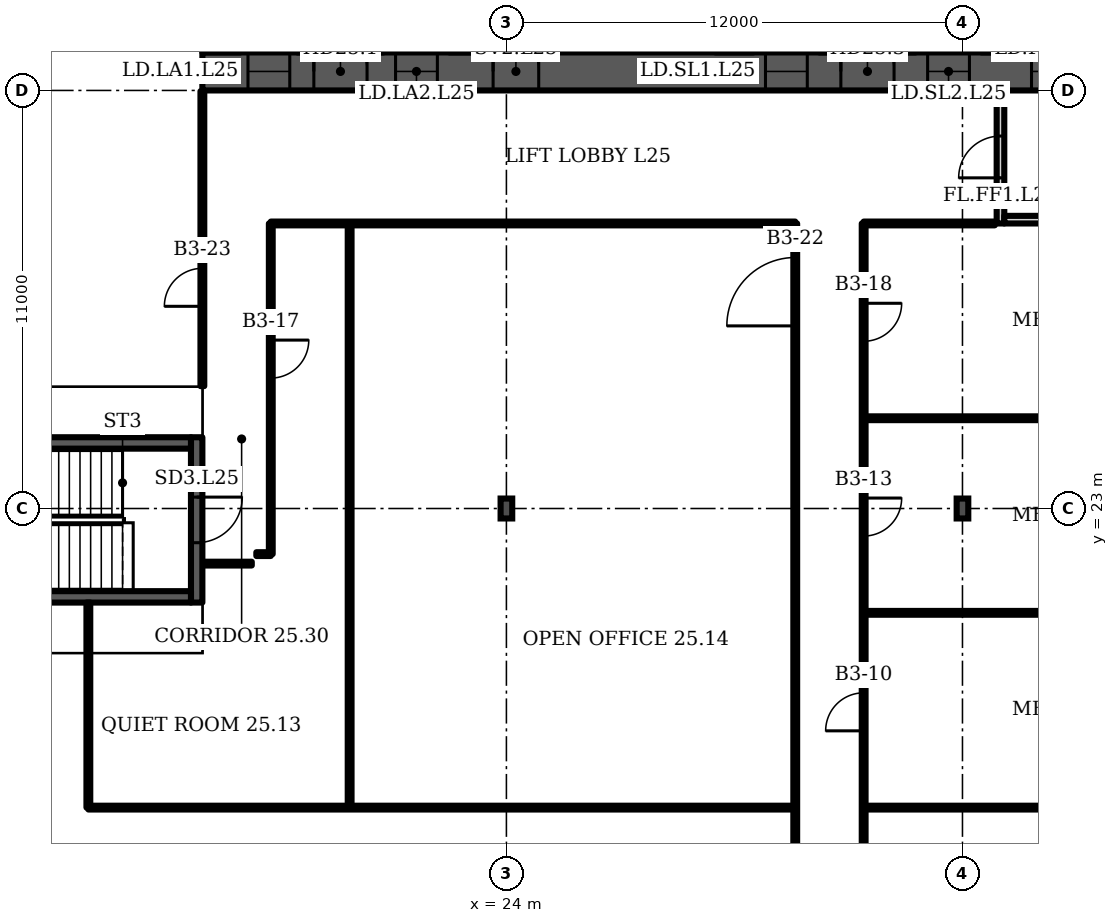
"""IFC4 building model, lengths in metres.
Left out: names, types, materials, properties, quantities, classifications, styles, units other than length and angle.
Written with IfcOpenShell. Run it as: python <this file> out.ifc"""

import sys

from ifc_helpers import new_model, si_unit, direction, frame, frame_2d, origin, origin_2d, place, context, subcontext, project, spatial, rectangle, i_section, extrude, element, fill, save


model = new_model("IFC4")
c1 = context("Model", 3, precision=1e-05, world=origin(), true_north=direction((0.0, 1.0)))
c2 = subcontext(c1, "Body", "Model", "MODEL_VIEW")
j1 = project(units=[si_unit("LENGTHUNIT", "METRE"), si_unit("PLANEANGLEUNIT", "RADIAN")], contexts=[c1])
p1 = place(None, origin())
s1 = spatial("IfcSite", under=j1, at=p1, CompositionType="ELEMENT")
p2 = place(p1, origin())
s2 = spatial("IfcBuilding", under=s1, at=p2, CompositionType="ELEMENT")
p3 = place(p2, frame((0.0, 0.0, 111.1)))
s3 = spatial("IfcBuildingStorey", under=s2, at=p3, CompositionType="ELEMENT", Elevation=111.1)
p4 = place(p3, frame((16.0, 34.5, 0.0), z_axis=(0.0, 0.0, 1.0), x_axis=(1.0, 0.0, 0.0)))
e1 = element("IfcWall", 1, at=p4, inside=s3, PredefinedType="SHEAR", context=c2, shape_type="SweptSolid", body=[
    extrude(rectangle(XDim=49.0, YDim=1.0, at=frame_2d((24.5, 0.0))), origin(), (0.0, 0.0, 1.0), 3.6),
])
p5 = place(p4, frame((1.2, 0.0, 0.0)))
e2 = element("IfcOpeningElement", 2, at=p5, cuts=e1, PredefinedType="OPENING", context=c2, shape_type="SweptSolid", body=[
    extrude(rectangle(XDim=1.1, YDim=2.1, at=frame_2d((0.55, 1.05))), frame((0.0, 0.51, 0.0), z_axis=(0.0, -1.0, 0.0), x_axis=(1.0, 0.0, 0.0)), (0.0, 0.0, 1.0), 1.02),
])
p6 = place(p4, frame((5.083, 0.0, 0.0)))
e3 = element("IfcOpeningElement", 3, at=p6, cuts=e1, PredefinedType="OPENING", context=c2, shape_type="SweptSolid", body=[
    extrude(rectangle(XDim=1.1, YDim=2.1, at=frame_2d((0.55, 1.05))), frame((0.0, 0.51, 0.0), z_axis=(0.0, -1.0, 0.0), x_axis=(1.0, 0.0, 0.0)), (0.0, 0.0, 1.0), 1.02),
])
p7 = place(p4, frame((2.933, 0.0, 0.0)))
e4 = element("IfcOpeningElement", 4, at=p7, cuts=e1, PredefinedType="OPENING", context=c2, shape_type="SweptSolid", body=[
    extrude(rectangle(XDim=1.4, YDim=2.1, at=frame_2d((0.7, 1.05))), frame((0.0, 0.51, 0.0), z_axis=(0.0, -1.0, 0.0), x_axis=(1.0, 0.0, 0.0)), (0.0, 0.0, 1.0), 1.02),
])
p8 = place(p4, frame((7.65, 0.0, 0.0)))
e5 = element("IfcOpeningElement", 5, at=p8, cuts=e1, PredefinedType="OPENING", context=c2, shape_type="SweptSolid", body=[
    extrude(rectangle(XDim=1.2, YDim=2.1, at=frame_2d((0.6, 1.05))), frame((0.0, 0.51, 0.0), z_axis=(0.0, -1.0, 0.0), x_axis=(1.0, 0.0, 0.0)), (0.0, 0.0, 1.0), 1.02),
])
p9 = place(p4, frame((14.817, 0.0, 0.0)))
e6 = element("IfcOpeningElement", 6, at=p9, cuts=e1, PredefinedType="OPENING", context=c2, shape_type="SweptSolid", body=[
    extrude(rectangle(XDim=1.1, YDim=2.1, at=frame_2d((0.55, 1.05))), frame((0.0, 0.51, 0.0), z_axis=(0.0, -1.0, 0.0), x_axis=(1.0, 0.0, 0.0)), (0.0, 0.0, 1.0), 1.02),
])
p10 = place(p4, frame((19.083, 0.0, 0.0)))
e7 = element("IfcOpeningElement", 7, at=p10, cuts=e1, PredefinedType="OPENING", context=c2, shape_type="SweptSolid", body=[
    extrude(rectangle(XDim=1.1, YDim=2.1, at=frame_2d((0.55, 1.05))), frame((0.0, 0.51, 0.0), z_axis=(0.0, -1.0, 0.0), x_axis=(1.0, 0.0, 0.0)), (0.0, 0.0, 1.0), 1.02),
])
p11 = place(p4, frame((16.8, 0.0, 0.0)))
e8 = element("IfcOpeningElement", 8, at=p11, cuts=e1, PredefinedType="OPENING", context=c2, shape_type="SweptSolid", body=[
    extrude(rectangle(XDim=1.4, YDim=2.1, at=frame_2d((0.7, 1.05))), frame((0.0, 0.51, 0.0), z_axis=(0.0, -1.0, 0.0), x_axis=(1.0, 0.0, 0.0)), (0.0, 0.0, 1.0), 1.02),
])
p12 = place(p4, frame((21.817, 0.0, 0.0)))
e9 = element("IfcOpeningElement", 9, at=p12, cuts=e1, PredefinedType="OPENING", context=c2, shape_type="SweptSolid", body=[
    extrude(rectangle(XDim=1.1, YDim=2.1, at=frame_2d((0.55, 1.05))), frame((0.0, 0.51, 0.0), z_axis=(0.0, -1.0, 0.0), x_axis=(1.0, 0.0, 0.0)), (0.0, 0.0, 1.0), 1.02),
])
p13 = place(p4, frame((26.083, 0.0, 0.0)))
e10 = element("IfcOpeningElement", 10, at=p13, cuts=e1, PredefinedType="OPENING", context=c2, shape_type="SweptSolid", body=[
    extrude(rectangle(XDim=1.1, YDim=2.1, at=frame_2d((0.55, 1.05))), frame((0.0, 0.51, 0.0), z_axis=(0.0, -1.0, 0.0), x_axis=(1.0, 0.0, 0.0)), (0.0, 0.0, 1.0), 1.02),
])
p14 = place(p4, frame((33.15, 0.0, 0.0)))
e11 = element("IfcOpeningElement", 11, at=p14, cuts=e1, PredefinedType="OPENING", context=c2, shape_type="SweptSolid", body=[
    extrude(rectangle(XDim=1.2, YDim=2.1, at=frame_2d((0.6, 1.05))), frame((0.0, 0.51, 0.0), z_axis=(0.0, -1.0, 0.0), x_axis=(1.0, 0.0, 0.0)), (0.0, 0.0, 1.0), 1.02),
])
p15 = place(p4, frame((37.8, 0.0, 0.0)))
e12 = element("IfcOpeningElement", 12, at=p15, cuts=e1, PredefinedType="OPENING", context=c2, shape_type="SweptSolid", body=[
    extrude(rectangle(XDim=1.4, YDim=2.1, at=frame_2d((0.7, 1.05))), frame((0.0, 0.51, 0.0), z_axis=(0.0, -1.0, 0.0), x_axis=(1.0, 0.0, 0.0)), (0.0, 0.0, 1.0), 1.02),
])
p16 = place(p4, frame((42.817, 0.0, 0.0)))
e13 = element("IfcOpeningElement", 13, at=p16, cuts=e1, PredefinedType="OPENING", context=c2, shape_type="SweptSolid", body=[
    extrude(rectangle(XDim=1.1, YDim=2.1, at=frame_2d((0.55, 1.05))), frame((0.0, 0.51, 0.0), z_axis=(0.0, -1.0, 0.0), x_axis=(1.0, 0.0, 0.0)), (0.0, 0.0, 1.0), 1.02),
])
p17 = place(p4, frame((46.7, 0.0, 0.0)))
e14 = element("IfcOpeningElement", 14, at=p17, cuts=e1, PredefinedType="OPENING", context=c2, shape_type="SweptSolid", body=[
    extrude(rectangle(XDim=1.1, YDim=2.1, at=frame_2d((0.55, 1.05))), frame((0.0, 0.51, 0.0), z_axis=(0.0, -1.0, 0.0), x_axis=(1.0, 0.0, 0.0)), (0.0, 0.0, 1.0), 1.02),
])
p18 = place(p4, frame((44.667, 0.0, 0.0)))
e15 = element("IfcOpeningElement", 15, at=p18, cuts=e1, PredefinedType="OPENING", context=c2, shape_type="SweptSolid", body=[
    extrude(rectangle(XDim=1.4, YDim=2.1, at=frame_2d((0.7, 1.05))), frame((0.0, 0.51, 0.0), z_axis=(0.0, -1.0, 0.0), x_axis=(1.0, 0.0, 0.0)), (0.0, 0.0, 1.0), 1.02),
])
for number, where, z_axis, x_axis in (
    (16, (24.0, 23.0, 0.0), (0.0, 0.0, 1.0), (1.0, 0.0, 0.0)),
    (17, (36.0, 23.0, 0.0), (0.0, 0.0, 1.0), (1.0, 0.0, 0.0)),
):
    element("IfcColumn", number, at=place(p3, frame(where, z_axis=z_axis, x_axis=x_axis)), inside=s3, PredefinedType="COLUMN", context=c2, shape_type="SweptSolid", body=[
        extrude(i_section(OverallWidth=0.306, OverallDepth=0.524, WebThickness=0.021, FlangeThickness=0.04, FilletRadius=0.027, at=origin_2d()), origin(), (0.0, 0.0, 1.0), 3.6),
    ])
p19 = place(p3, frame((37.0, 30.5, 0.0), z_axis=(0.0, 0.0, 1.0), x_axis=(0.0, 1.0, 0.0)))
e18 = element("IfcWall", 18, at=p19, inside=s3, PredefinedType="PARTITIONING", context=c2, shape_type="SweptSolid", body=[
    extrude(rectangle(XDim=3.5, YDim=0.2, at=frame_2d((1.75, 0.0))), origin(), (0.0, 0.0, 1.0), 3.2),
])
p20 = place(p19, frame((1.2, 0.0, 0.0)))
e19 = element("IfcOpeningElement", 19, at=p20, cuts=e18, PredefinedType="OPENING", context=c2, shape_type="SweptSolid", body=[
    extrude(rectangle(XDim=1.1, YDim=2.1, at=frame_2d((0.55, 1.05))), frame((0.0, 0.11, 0.0), z_axis=(0.0, -1.0, 0.0), x_axis=(1.0, 0.0, 0.0)), (0.0, 0.0, 1.0), 0.22),
])
p21 = place(p3, frame((37.1, 30.6, 0.0), z_axis=(0.0, 0.0, 1.0), x_axis=(1.0, 0.0, 0.0)))
e20 = element("IfcWall", 20, at=p21, inside=s3, PredefinedType="PARTITIONING", context=c2, shape_type="SweptSolid", body=[
    extrude(rectangle(XDim=2.8, YDim=0.2, at=frame_2d((1.4, 0.0))), origin(), (0.0, 0.0, 1.0), 3.2),
])
p22 = place(p3, frame((15.85, 20.525, 0.0), z_axis=(0.0, 0.0, 1.0), x_axis=(0.0, 1.0, 0.0)))
e21 = element("IfcWall", 21, at=p22, inside=s3, PredefinedType="SHEAR", context=c2, shape_type="SweptSolid", body=[
    extrude(rectangle(XDim=4.35, YDim=0.3, at=frame_2d((2.175, 0.0))), origin(), (0.0, 0.0, 1.0), 3.2),
])
p23 = place(p22, frame((1.575, 0.0, 0.0)))
e22 = element("IfcOpeningElement", 22, at=p23, cuts=e21, PredefinedType="OPENING", context=c2, shape_type="SweptSolid", body=[
    extrude(rectangle(XDim=1.2, YDim=2.1, at=frame_2d((0.6, 1.05))), frame((0.0, 0.16, 0.0), z_axis=(0.0, -1.0, 0.0), x_axis=(1.0, 0.0, 0.0)), (0.0, 0.0, 1.0), 0.32),
])
p24 = place(p3, frame((13.0, 15.13, 0.0), z_axis=(0.0, 0.0, 1.0), x_axis=(0.0, 1.0, 0.0)))
e23 = element("IfcWall", 23, at=p24, inside=s3, PredefinedType="PARTITIONING", context=c2, shape_type="SweptSolid", body=[
    extrude(rectangle(XDim=5.395, YDim=0.1, at=frame_2d((2.698, 0.0))), origin(), (0.0, 0.0, 1.0), 3.2),
])
p25 = place(p3, frame((13.0, 15.13, 0.0), z_axis=(0.0, 0.0, 1.0), x_axis=(1.0, 0.0, 0.0)))
e24 = element("IfcWall", 24, at=p25, inside=s3, PredefinedType="PARTITIONING", context=c2, shape_type="SweptSolid", body=[
    extrude(rectangle(XDim=18.6, YDim=0.1, at=frame_2d((9.3, 0.0))), origin(), (0.0, 0.0, 1.0), 3.2),
])
p26 = place(p3, frame((16.0, 26.22, 0.0), z_axis=(0.0, 0.0, 1.0), x_axis=(0.0, 1.0, 0.0)))
e25 = element("IfcWall", 25, at=p26, inside=s3, PredefinedType="PARTITIONING", context=c2, shape_type="SweptSolid", body=[
    extrude(rectangle(XDim=7.76, YDim=0.1, at=frame_2d((3.88, 0.0))), origin(), (0.0, 0.0, 1.0), 3.2),
])
p27 = place(p26, frame((2.1, 0.0, 0.0)))
e26 = element("IfcOpeningElement", 26, at=p27, cuts=e25, PredefinedType="OPENING", context=c2, shape_type="SweptSolid", body=[
    extrude(rectangle(XDim=1.0, YDim=2.1, at=frame_2d((0.5, 1.05))), frame((0.0, 0.06, 0.0), z_axis=(0.0, -1.0, 0.0), x_axis=(1.0, 0.0, 0.0)), (0.0, 0.0, 1.0), 0.12),
])
p28 = place(p3, frame((16.02, 21.55, 0.0), z_axis=(0.0, 0.0, 1.0), x_axis=(1.0, 0.0, 0.0)))
e27 = element("IfcWall", 27, at=p28, inside=s3, PredefinedType="PARTITIONING", context=c2, shape_type="SweptSolid", body=[
    extrude(rectangle(XDim=1.28, YDim=0.1, at=frame_2d((0.64, 0.0))), origin(), (0.0, 0.0, 1.0), 3.2),
])
p29 = place(p3, frame((17.42, 21.8, 0.0), z_axis=(0.0, 0.0, 1.0), x_axis=(1.0, 0.0, 0.0)))
e28 = element("IfcWall", 28, at=p29, inside=s3, PredefinedType="PARTITIONING", context=c2, shape_type="SweptSolid", body=[
    extrude(rectangle(XDim=0.38, YDim=0.1, at=frame_2d((0.19, 0.0))), origin(), (0.0, 0.0, 1.0), 3.2),
])
p30 = place(p3, frame((17.8, 21.8, 0.0), z_axis=(0.0, 0.0, 1.0), x_axis=(0.0, 1.0, 0.0)))
e29 = element("IfcWall", 29, at=p30, inside=s3, PredefinedType="PARTITIONING", context=c2, shape_type="SweptSolid", body=[
    extrude(rectangle(XDim=8.7, YDim=0.1, at=frame_2d((4.35, 0.0))), origin(), (0.0, 0.0, 1.0), 3.2),
])
p31 = place(p30, frame((4.631, 0.0, 0.0)))
e30 = element("IfcOpeningElement", 30, at=p31, cuts=e29, PredefinedType="OPENING", context=c2, shape_type="SweptSolid", body=[
    extrude(rectangle(XDim=1.0, YDim=2.1, at=frame_2d((0.5, 1.05))), frame((0.0, 0.06, 0.0), z_axis=(0.0, -1.0, 0.0), x_axis=(1.0, 0.0, 0.0)), (0.0, 0.0, 1.0), 0.12),
])
p32 = place(p3, frame((17.8, 30.5, 0.0), z_axis=(0.0, 0.0, 1.0), x_axis=(1.0, 0.0, 0.0)))
e31 = element("IfcWall", 31, at=p32, inside=s3, PredefinedType="PARTITIONING", context=c2, shape_type="SweptSolid", body=[
    extrude(rectangle(XDim=13.8, YDim=0.1, at=frame_2d((6.9, 0.0))), origin(), (0.0, 0.0, 1.0), 3.2),
])
p33 = place(p3, frame((19.875, 15.13, 0.0), z_axis=(0.0, 0.0, 1.0), x_axis=(0.0, 1.0, 0.0)))
e32 = element("IfcWall", 32, at=p33, inside=s3, PredefinedType="PARTITIONING", context=c2, shape_type="SweptSolid", body=[
    extrude(rectangle(XDim=15.37, YDim=0.1, at=frame_2d((7.685, 0.0))), origin(), (0.0, 0.0, 1.0), 3.2),
])
p34 = place(p3, frame((31.6, 0.56, 0.0), z_axis=(0.0, 0.0, 1.0), x_axis=(0.0, 1.0, 0.0)))
e33 = element("IfcWall", 33, at=p34, inside=s3, PredefinedType="PARTITIONING", context=c2, shape_type="SweptSolid", body=[
    extrude(rectangle(XDim=29.94, YDim=0.1, at=frame_2d((14.97, 0.0))), origin(), (0.0, 0.0, 1.0), 3.2),
])
p35 = place(p34, frame((6.75, 0.0, 0.0)))
e34 = element("IfcOpeningElement", 34, at=p35, cuts=e33, PredefinedType="OPENING", context=c2, shape_type="SweptSolid", body=[
    extrude(rectangle(XDim=1.0, YDim=2.1, at=frame_2d((0.5, 1.05))), frame((0.0, 0.06, 0.0), z_axis=(0.0, -1.0, 0.0), x_axis=(1.0, 0.0, 0.0)), (0.0, 0.0, 1.0), 0.12),
])
p36 = place(p34, frame((27.245, 0.0, 0.0)))
e35 = element("IfcOpeningElement", 35, at=p36, cuts=e33, PredefinedType="OPENING", context=c2, shape_type="SweptSolid", body=[
    extrude(rectangle(XDim=1.8, YDim=2.1, at=frame_2d((0.9, 1.05))), frame((0.0, 0.06, 0.0), z_axis=(0.0, -1.0, 0.0), x_axis=(1.0, 0.0, 0.0)), (0.0, 0.0, 1.0), 0.12),
])
p37 = place(p3, frame((33.4, 10.22, 0.0), z_axis=(0.0, 0.0, 1.0), x_axis=(0.0, 1.0, 0.0)))
e36 = element("IfcWall", 36, at=p37, inside=s3, PredefinedType="PARTITIONING", context=c2, shape_type="SweptSolid", body=[
    extrude(rectangle(XDim=20.28, YDim=0.1, at=frame_2d((10.14, 0.0))), origin(), (0.0, 0.0, 1.0), 3.2),
])
p38 = place(p37, frame((6.93, 0.0, 0.0)))
e37 = element("IfcOpeningElement", 37, at=p38, cuts=e36, PredefinedType="OPENING", context=c2, shape_type="SweptSolid", body=[
    extrude(rectangle(XDim=1.0, YDim=2.1, at=frame_2d((0.5, 1.05))), frame((0.0, 0.06, 0.0), z_axis=(0.0, -1.0, 0.0), x_axis=(1.0, 0.0, 0.0)), (0.0, 0.0, 1.0), 0.12),
])
p39 = place(p37, frame((12.055, 0.0, 0.0)))
e38 = element("IfcOpeningElement", 38, at=p39, cuts=e36, PredefinedType="OPENING", context=c2, shape_type="SweptSolid", body=[
    extrude(rectangle(XDim=1.0, YDim=2.1, at=frame_2d((0.5, 1.05))), frame((0.0, 0.06, 0.0), z_axis=(0.0, -1.0, 0.0), x_axis=(1.0, 0.0, 0.0)), (0.0, 0.0, 1.0), 0.12),
])
p40 = place(p37, frame((17.18, 0.0, 0.0)))
e39 = element("IfcOpeningElement", 39, at=p40, cuts=e36, PredefinedType="OPENING", context=c2, shape_type="SweptSolid", body=[
    extrude(rectangle(XDim=1.0, YDim=2.1, at=frame_2d((0.5, 1.05))), frame((0.0, 0.06, 0.0), z_axis=(0.0, -1.0, 0.0), x_axis=(1.0, 0.0, 0.0)), (0.0, 0.0, 1.0), 0.12),
])
p41 = place(p3, frame((33.4, 15.13, 0.0), z_axis=(0.0, 0.0, 1.0), x_axis=(1.0, 0.0, 0.0)))
e40 = element("IfcWall", 40, at=p41, inside=s3, PredefinedType="PARTITIONING", context=c2, shape_type="SweptSolid", body=[
    extrude(rectangle(XDim=24.2, YDim=0.1, at=frame_2d((12.1, 0.0))), origin(), (0.0, 0.0, 1.0), 3.2),
])
for number, where, z_axis, x_axis in (
    (41, (33.4, 20.255, 0.0), (0.0, 0.0, 1.0), (1.0, 0.0, 0.0)),
    (42, (33.4, 25.375, 0.0), (0.0, 0.0, 1.0), (1.0, 0.0, 0.0)),
):
    element("IfcWall", number, at=place(p3, frame(where, z_axis=z_axis, x_axis=x_axis)), inside=s3, PredefinedType="PARTITIONING", context=c2, shape_type="SweptSolid", body=[
        extrude(rectangle(XDim=13.975, YDim=0.1, at=frame_2d((6.988, 0.0))), origin(), (0.0, 0.0, 1.0), 3.2),
    ])
p42 = place(p3, frame((33.4, 30.5, 0.0), z_axis=(0.0, 0.0, 1.0), x_axis=(1.0, 0.0, 0.0)))
e43 = element("IfcWall", 43, at=p42, inside=s3, PredefinedType="PARTITIONING", context=c2, shape_type="SweptSolid", body=[
    extrude(rectangle(XDim=3.45, YDim=0.1, at=frame_2d((1.725, 0.0))), origin(), (0.0, 0.0, 1.0), 3.2),
])
for number, where, z_axis, x_axis in (
    (44, (8.2, 20.675, 0.0), (0.0, 0.0, 1.0), (1.0, 0.0, 0.0)),
    (45, (8.2, 24.725, 0.0), (0.0, 0.0, 1.0), (1.0, 0.0, 0.0)),
):
    element("IfcWall", number, at=place(p3, frame(where, z_axis=z_axis, x_axis=x_axis)), inside=s3, PredefinedType="SHEAR", context=c2, shape_type="SweptSolid", body=[
        extrude(rectangle(XDim=7.5, YDim=0.3, at=frame_2d((3.75, 0.0))), origin(), (0.0, 0.0, 1.0), 3.2),
    ])
p43 = place(p5, origin())
e46 = element("IfcDoor", 46, at=p43, inside=s3, OperationType="DOUBLE_DOOR_SLIDING", PredefinedType="DOOR", context=c2, shape_type="SweptSolid", body=[
    extrude(rectangle(XDim=1.1, YDim=2.1, at=frame_2d((0.55, 1.05))), frame((0.0, 0.025, 0.0), z_axis=(0.0, -1.0, 0.0), x_axis=(1.0, 0.0, 0.0)), (0.0, 0.0, 1.0), 0.05),
])
fill(e2, e46)
p44 = place(p6, origin())
e47 = element("IfcDoor", 47, at=p44, inside=s3, OperationType="DOUBLE_DOOR_SLIDING", PredefinedType="DOOR", context=c2, shape_type="SweptSolid", body=[
    extrude(rectangle(XDim=1.1, YDim=2.1, at=frame_2d((0.55, 1.05))), frame((0.0, 0.025, 0.0), z_axis=(0.0, -1.0, 0.0), x_axis=(1.0, 0.0, 0.0)), (0.0, 0.0, 1.0), 0.05),
])
fill(e3, e47)
p45 = place(p7, origin())
e48 = element("IfcDoor", 48, at=p45, inside=s3, OperationType="DOUBLE_DOOR_SINGLE_SWING", PredefinedType="DOOR", context=c2, shape_type="SweptSolid", body=[
    extrude(rectangle(XDim=1.4, YDim=2.1, at=frame_2d((0.7, 1.05))), frame((0.0, 0.025, 0.0), z_axis=(0.0, -1.0, 0.0), x_axis=(1.0, 0.0, 0.0)), (0.0, 0.0, 1.0), 0.05),
])
fill(e4, e48)
p46 = place(p8, origin())
e49 = element("IfcDoor", 49, at=p46, inside=s3, OperationType="SINGLE_SWING_LEFT", PredefinedType="DOOR", context=c2, shape_type="SweptSolid", body=[
    extrude(rectangle(XDim=1.2, YDim=2.1, at=frame_2d((0.6, 1.05))), frame((0.0, 0.025, 0.0), z_axis=(0.0, -1.0, 0.0), x_axis=(1.0, 0.0, 0.0)), (0.0, 0.0, 1.0), 0.05),
])
fill(e5, e49)
p47 = place(p9, origin())
e50 = element("IfcDoor", 50, at=p47, inside=s3, OperationType="DOUBLE_DOOR_SLIDING", PredefinedType="DOOR", context=c2, shape_type="SweptSolid", body=[
    extrude(rectangle(XDim=1.1, YDim=2.1, at=frame_2d((0.55, 1.05))), frame((0.0, 0.025, 0.0), z_axis=(0.0, -1.0, 0.0), x_axis=(1.0, 0.0, 0.0)), (0.0, 0.0, 1.0), 0.05),
])
fill(e6, e50)
p48 = place(p10, origin())
e51 = element("IfcDoor", 51, at=p48, inside=s3, OperationType="DOUBLE_DOOR_SLIDING", PredefinedType="DOOR", context=c2, shape_type="SweptSolid", body=[
    extrude(rectangle(XDim=1.1, YDim=2.1, at=frame_2d((0.55, 1.05))), frame((0.0, 0.025, 0.0), z_axis=(0.0, -1.0, 0.0), x_axis=(1.0, 0.0, 0.0)), (0.0, 0.0, 1.0), 0.05),
])
fill(e7, e51)
p49 = place(p11, origin())
e52 = element("IfcDoor", 52, at=p49, inside=s3, OperationType="DOUBLE_DOOR_SINGLE_SWING", PredefinedType="DOOR", context=c2, shape_type="SweptSolid", body=[
    extrude(rectangle(XDim=1.4, YDim=2.1, at=frame_2d((0.7, 1.05))), frame((0.0, 0.025, 0.0), z_axis=(0.0, -1.0, 0.0), x_axis=(1.0, 0.0, 0.0)), (0.0, 0.0, 1.0), 0.05),
])
fill(e8, e52)
p50 = place(p12, origin())
e53 = element("IfcDoor", 53, at=p50, inside=s3, OperationType="DOUBLE_DOOR_SLIDING", PredefinedType="DOOR", context=c2, shape_type="SweptSolid", body=[
    extrude(rectangle(XDim=1.1, YDim=2.1, at=frame_2d((0.55, 1.05))), frame((0.0, 0.025, 0.0), z_axis=(0.0, -1.0, 0.0), x_axis=(1.0, 0.0, 0.0)), (0.0, 0.0, 1.0), 0.05),
])
fill(e9, e53)
p51 = place(p20, origin())
e54 = element("IfcDoor", 54, at=p51, inside=s3, OperationType="SINGLE_SWING_LEFT", PredefinedType="DOOR", context=c2, shape_type="SweptSolid", body=[
    extrude(rectangle(XDim=1.1, YDim=2.1, at=frame_2d((0.55, 1.05))), frame((0.0, 0.025, 0.0), z_axis=(0.0, -1.0, 0.0), x_axis=(1.0, 0.0, 0.0)), (0.0, 0.0, 1.0), 0.05),
])
fill(e19, e54)
p52 = place(p23, origin())
e55 = element("IfcDoor", 55, at=p52, inside=s3, OperationType="SINGLE_SWING_RIGHT", PredefinedType="DOOR", context=c2, shape_type="SweptSolid", body=[
    extrude(rectangle(XDim=1.2, YDim=2.1, at=frame_2d((0.6, 1.05))), frame((0.0, 0.025, 0.0), z_axis=(0.0, -1.0, 0.0), x_axis=(1.0, 0.0, 0.0)), (0.0, 0.0, 1.0), 0.05),
])
fill(e22, e55)
p53 = place(p38, origin())
e56 = element("IfcDoor", 56, at=p53, inside=s3, OperationType="SINGLE_SWING_LEFT", PredefinedType="DOOR", context=c2, shape_type="SweptSolid", body=[
    extrude(rectangle(XDim=1.0, YDim=2.1, at=frame_2d((0.5, 1.05))), frame((0.0, 0.025, 0.0), z_axis=(0.0, -1.0, 0.0), x_axis=(1.0, 0.0, 0.0)), (0.0, 0.0, 1.0), 0.05),
])
fill(e37, e56)
p54 = place(p39, origin())
e57 = element("IfcDoor", 57, at=p54, inside=s3, OperationType="SINGLE_SWING_RIGHT", PredefinedType="DOOR", context=c2, shape_type="SweptSolid", body=[
    extrude(rectangle(XDim=1.0, YDim=2.1, at=frame_2d((0.5, 1.05))), frame((0.0, 0.025, 0.0), z_axis=(0.0, -1.0, 0.0), x_axis=(1.0, 0.0, 0.0)), (0.0, 0.0, 1.0), 0.05),
])
fill(e38, e57)
p55 = place(p31, origin())
e58 = element("IfcDoor", 58, at=p55, inside=s3, OperationType="SINGLE_SWING_RIGHT", PredefinedType="DOOR", context=c2, shape_type="SweptSolid", body=[
    extrude(rectangle(XDim=1.0, YDim=2.1, at=frame_2d((0.5, 1.05))), frame((0.0, 0.025, 0.0), z_axis=(0.0, -1.0, 0.0), x_axis=(1.0, 0.0, 0.0)), (0.0, 0.0, 1.0), 0.05),
])
fill(e30, e58)
p56 = place(p40, origin())
e59 = element("IfcDoor", 59, at=p56, inside=s3, OperationType="SINGLE_SWING_RIGHT", PredefinedType="DOOR", context=c2, shape_type="SweptSolid", body=[
    extrude(rectangle(XDim=1.0, YDim=2.1, at=frame_2d((0.5, 1.05))), frame((0.0, 0.025, 0.0), z_axis=(0.0, -1.0, 0.0), x_axis=(1.0, 0.0, 0.0)), (0.0, 0.0, 1.0), 0.05),
])
fill(e39, e59)
p57 = place(p36, origin())
e60 = element("IfcDoor", 60, at=p57, inside=s3, OperationType="DOUBLE_DOOR_SINGLE_SWING", PredefinedType="DOOR", context=c2, shape_type="SweptSolid", body=[
    extrude(rectangle(XDim=1.8, YDim=2.1, at=frame_2d((0.9, 1.05))), frame((0.0, 0.025, 0.0), z_axis=(0.0, -1.0, 0.0), x_axis=(1.0, 0.0, 0.0)), (0.0, 0.0, 1.0), 0.05),
])
fill(e35, e60)
p58 = place(p27, origin())
e61 = element("IfcDoor", 61, at=p58, inside=s3, OperationType="SINGLE_SWING_LEFT", PredefinedType="DOOR", context=c2, shape_type="SweptSolid", body=[
    extrude(rectangle(XDim=1.0, YDim=2.1, at=frame_2d((0.5, 1.05))), frame((0.0, 0.025, 0.0), z_axis=(0.0, -1.0, 0.0), x_axis=(1.0, 0.0, 0.0)), (0.0, 0.0, 1.0), 0.05),
])
fill(e26, e61)
save(model, sys.argv[1])
